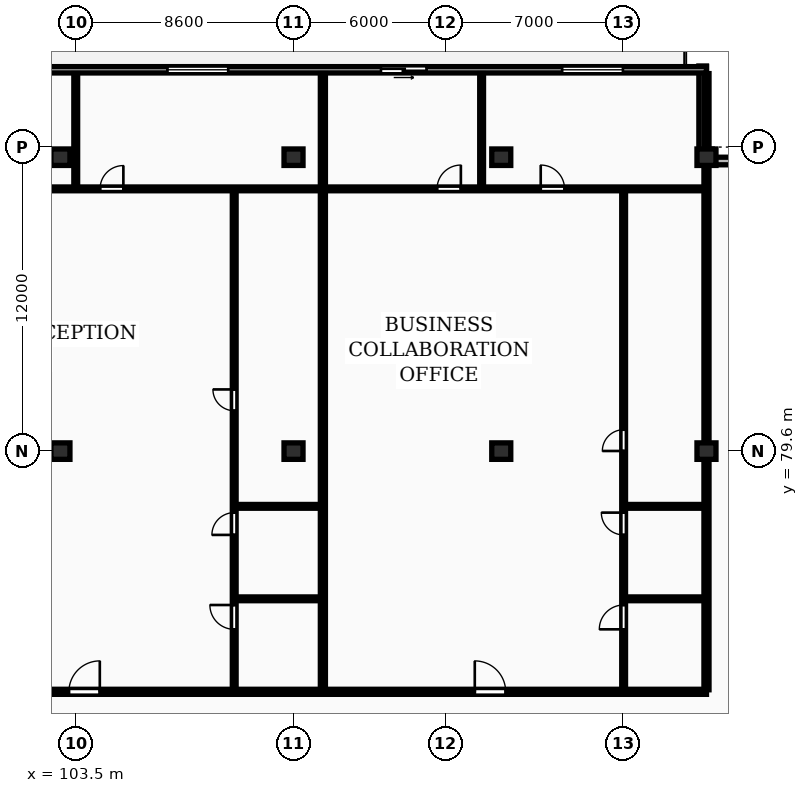
"""IFC4 building model, lengths in metres.
Left out: names, types, materials, properties, quantities, classifications, styles, units other than length and angle.
Written with IfcOpenShell. Run it as: python <this file> out.ifc"""

import sys

from ifc_helpers import new_model, si_unit, direction, frame, frame_2d, origin, origin_2d, place, context, subcontext, project, spatial, rectangle, extrude, element, fill, save


model = new_model("IFC4")
c1 = context("Model", 3, precision=1e-05, world=origin(), true_north=direction((0.0, 1.0)))
c2 = subcontext(c1, "Body", "Model", "MODEL_VIEW")
j1 = project(units=[si_unit("LENGTHUNIT", "METRE"), si_unit("PLANEANGLEUNIT", "RADIAN")], contexts=[c1])
p1 = place(None, origin())
s1 = spatial("IfcSite", under=j1, at=p1, CompositionType="ELEMENT")
p2 = place(p1, origin())
s2 = spatial("IfcBuilding", under=s1, at=p2, CompositionType="ELEMENT")
p3 = place(p2, frame((0.0, 0.0, 249.35)))
s3 = spatial("IfcBuildingStorey", under=s2, at=p3, CompositionType="ELEMENT", Elevation=249.35)
for number, where, z_axis, x_axis in (
    (1, (102.9, 79.6, 0.0), (0.0, 0.0, 1.0), (1.0, 0.0, 0.0)),
    (2, (102.9, 91.2, 0.0), (0.0, 0.0, 1.0), (1.0, 0.0, 0.0)),
    (3, (112.1, 79.6, 0.0), (0.0, 0.0, 1.0), (1.0, 0.0, 0.0)),
    (4, (112.1, 91.2, 0.0), (0.0, 0.0, 1.0), (1.0, 0.0, 0.0)),
    (5, (120.3, 79.6, 0.0), (0.0, 0.0, 1.0), (1.0, 0.0, 0.0)),
    (6, (120.3, 91.2, 0.0), (0.0, 0.0, 1.0), (1.0, 0.0, 0.0)),
    (7, (128.4, 79.6, 0.0), (0.0, 0.0, 1.0), (1.0, 0.0, 0.0)),
    (8, (128.4, 91.2, 0.0), (0.0, 0.0, 1.0), (1.0, 0.0, 0.0)),
):
    element("IfcColumn", number, at=place(p3, frame(where, z_axis=z_axis, x_axis=x_axis)), inside=s3, PredefinedType="COLUMN", context=c2, shape_type="SweptSolid", body=[
        extrude(rectangle(XDim=0.75, YDim=0.65, at=origin_2d()), origin(), (0.0, 0.0, 1.0), 3.45),
    ])
for number, where, z_axis, x_axis in (
    (9, (132.0, 91.05, 0.0), (0.0, 0.0, 1.0), (-1.0, 0.0, 0.0)),
    (10, (128.25, 91.2, 0.0), (0.0, 0.0, 1.0), (0.0, 1.0, 0.0)),
):
    element("IfcWall", number, at=place(p3, frame(where, z_axis=z_axis, x_axis=x_axis)), inside=s3, PredefinedType="STANDARD", context=c2, shape_type="SweptSolid", body=[
        extrude(rectangle(XDim=3.6, YDim=0.3, at=frame_2d((1.8, 0.0))), origin(), (0.0, 0.0, 1.0), 3.17),
    ])
p4 = place(p3, frame((128.4, 94.65, 0.0), z_axis=(0.0, 0.0, 1.0), x_axis=(-1.0, 0.0, 0.0)))
e11 = element("IfcWall", 11, at=p4, inside=s3, PredefinedType="STANDARD", context=c2, shape_type="SweptSolid", body=[
    extrude(rectangle(XDim=68.6, YDim=0.25, at=frame_2d((34.3, 0.0))), origin(), (0.0, 0.0, 1.0), 3.17),
])
p5 = place(p4, frame((60.518, 0.0, 0.85)))
e12 = element("IfcOpeningElement", 12, at=p5, cuts=e11, PredefinedType="OPENING", context=c2, shape_type="SweptSolid", body=[
    extrude(rectangle(XDim=2.4, YDim=1.9, at=frame_2d((1.2, 0.95))), frame((0.0, 0.135, 0.0), z_axis=(0.0, -1.0, 0.0), x_axis=(1.0, 0.0, 0.0)), (0.0, 0.0, 1.0), 0.27),
])
p6 = place(p4, frame((55.492, 0.0, 0.85)))
e13 = element("IfcOpeningElement", 13, at=p6, cuts=e11, PredefinedType="OPENING", context=c2, shape_type="SweptSolid", body=[
    extrude(rectangle(XDim=2.4, YDim=1.9, at=frame_2d((1.2, 0.95))), frame((0.0, 0.135, 0.0), z_axis=(0.0, -1.0, 0.0), x_axis=(1.0, 0.0, 0.0)), (0.0, 0.0, 1.0), 0.27),
])
p7 = place(p4, frame((65.455, 0.0, 0.0)))
e14 = element("IfcOpeningElement", 14, at=p7, cuts=e11, PredefinedType="OPENING", context=c2, shape_type="SweptSolid", body=[
    extrude(rectangle(XDim=1.8, YDim=2.2, at=frame_2d((0.9, 1.1))), frame((0.0, 0.135, 0.0), z_axis=(0.0, -1.0, 0.0), x_axis=(1.0, 0.0, 0.0)), (0.0, 0.0, 1.0), 0.27),
])
p8 = place(p4, frame((50.746, 0.0, 0.85)))
e15 = element("IfcOpeningElement", 15, at=p8, cuts=e11, PredefinedType="OPENING", context=c2, shape_type="SweptSolid", body=[
    extrude(rectangle(XDim=2.4, YDim=1.9, at=frame_2d((1.2, 0.95))), frame((0.0, 0.135, 0.0), z_axis=(0.0, -1.0, 0.0), x_axis=(1.0, 0.0, 0.0)), (0.0, 0.0, 1.0), 0.27),
])
p9 = place(p4, frame((39.76, 0.0, 0.85)))
e16 = element("IfcOpeningElement", 16, at=p9, cuts=e11, PredefinedType="OPENING", context=c2, shape_type="SweptSolid", body=[
    extrude(rectangle(XDim=1.8, YDim=1.8, at=frame_2d((0.9, 0.9))), frame((0.0, 0.135, 0.0), z_axis=(0.0, -1.0, 0.0), x_axis=(1.0, 0.0, 0.0)), (0.0, 0.0, 1.0), 0.27),
])
p10 = place(p4, frame((37.04, 0.0, 0.85)))
e17 = element("IfcOpeningElement", 17, at=p10, cuts=e11, PredefinedType="OPENING", context=c2, shape_type="SweptSolid", body=[
    extrude(rectangle(XDim=1.8, YDim=1.8, at=frame_2d((0.9, 0.9))), frame((0.0, 0.135, 0.0), z_axis=(0.0, -1.0, 0.0), x_axis=(1.0, 0.0, 0.0)), (0.0, 0.0, 1.0), 0.27),
])
p11 = place(p4, frame((44.845, 0.0, 0.0)))
e18 = element("IfcOpeningElement", 18, at=p11, cuts=e11, PredefinedType="OPENING", context=c2, shape_type="SweptSolid", body=[
    extrude(rectangle(XDim=1.8, YDim=2.2, at=frame_2d((0.9, 1.1))), frame((0.0, 0.135, 0.0), z_axis=(0.0, -1.0, 0.0), x_axis=(1.0, 0.0, 0.0)), (0.0, 0.0, 1.0), 0.27),
])
p12 = place(p4, frame((33.056, 0.0, 0.85)))
e19 = element("IfcOpeningElement", 19, at=p12, cuts=e11, PredefinedType="OPENING", context=c2, shape_type="SweptSolid", body=[
    extrude(rectangle(XDim=2.4, YDim=1.9, at=frame_2d((1.2, 0.95))), frame((0.0, 0.135, 0.0), z_axis=(0.0, -1.0, 0.0), x_axis=(1.0, 0.0, 0.0)), (0.0, 0.0, 1.0), 0.27),
])
p13 = place(p4, frame((27.394, 0.0, 0.0)))
e20 = element("IfcOpeningElement", 20, at=p13, cuts=e11, PredefinedType="OPENING", context=c2, shape_type="SweptSolid", body=[
    extrude(rectangle(XDim=1.8, YDim=2.2, at=frame_2d((0.9, 1.1))), frame((0.0, 0.135, 0.0), z_axis=(0.0, -1.0, 0.0), x_axis=(1.0, 0.0, 0.0)), (0.0, 0.0, 1.0), 0.27),
])
p14 = place(p4, frame((18.879, 0.0, 0.85)))
e21 = element("IfcOpeningElement", 21, at=p14, cuts=e11, PredefinedType="OPENING", context=c2, shape_type="SweptSolid", body=[
    extrude(rectangle(XDim=2.4, YDim=1.9, at=frame_2d((1.2, 0.95))), frame((0.0, 0.135, 0.0), z_axis=(0.0, -1.0, 0.0), x_axis=(1.0, 0.0, 0.0)), (0.0, 0.0, 1.0), 0.27),
])
p15 = place(p4, frame((11.048, 0.0, 0.0)))
e22 = element("IfcOpeningElement", 22, at=p15, cuts=e11, PredefinedType="OPENING", context=c2, shape_type="SweptSolid", body=[
    extrude(rectangle(XDim=1.8, YDim=2.2, at=frame_2d((0.9, 1.1))), frame((0.0, 0.135, 0.0), z_axis=(0.0, -1.0, 0.0), x_axis=(1.0, 0.0, 0.0)), (0.0, 0.0, 1.0), 0.27),
])
p16 = place(p4, frame((3.298, 0.0, 0.85)))
e23 = element("IfcOpeningElement", 23, at=p16, cuts=e11, PredefinedType="OPENING", context=c2, shape_type="SweptSolid", body=[
    extrude(rectangle(XDim=2.4, YDim=1.9, at=frame_2d((1.2, 0.95))), frame((0.0, 0.135, 0.0), z_axis=(0.0, -1.0, 0.0), x_axis=(1.0, 0.0, 0.0)), (0.0, 0.0, 1.0), 0.27),
])
p17 = place(p3, frame((128.4, 70.18, 0.0), z_axis=(0.0, 0.0, 1.0), x_axis=(0.0, 1.0, 0.0)))
e24 = element("IfcWall", 24, at=p17, inside=s3, PredefinedType="PARTITIONING", context=c2, shape_type="SweptSolid", body=[
    extrude(rectangle(XDim=24.32, YDim=0.2, at=frame_2d((12.16, 0.0))), origin(), (0.0, 0.0, 1.0), 2.477),
])
p18 = place(p3, frame((113.259, 70.18, 0.0), z_axis=(0.0, 0.0, 1.0), x_axis=(0.0, 1.0, 0.0)))
e25 = element("IfcWall", 25, at=p18, inside=s3, PredefinedType="PARTITIONING", context=c2, shape_type="SweptSolid", body=[
    extrude(rectangle(XDim=24.32, YDim=0.2, at=frame_2d((12.16, 0.0))), origin(), (0.0, 0.0, 1.0), 3.17),
])
for number, where, z_axis, x_axis in (
    (26, (109.819, 73.77, 0.0), (0.0, 0.0, 1.0), (1.0, 0.0, 0.0)),
    (27, (109.819, 77.42, 0.0), (0.0, 0.0, 1.0), (1.0, 0.0, 0.0)),
):
    element("IfcWall", number, at=place(p3, frame(where, z_axis=z_axis, x_axis=x_axis)), inside=s3, PredefinedType="PARTITIONING", context=c2, shape_type="SweptSolid", body=[
        extrude(rectangle(XDim=3.36, YDim=0.15, at=frame_2d((1.68, 0.0))), origin(), (0.0, 0.0, 1.0), 3.17),
    ])
p19 = place(p3, frame((109.759, 70.16, 0.0), z_axis=(0.0, 0.0, 1.0), x_axis=(0.0, 1.0, 0.0)))
e28 = element("IfcWall", 28, at=p19, inside=s3, PredefinedType="PARTITIONING", context=c2, shape_type="SweptSolid", body=[
    extrude(rectangle(XDim=19.73, YDim=0.15, at=frame_2d((9.865, 0.0))), origin(), (0.0, 0.0, 1.0), 3.17),
])
p20 = place(p19, frame((2.406, 0.0, 0.0)))
e29 = element("IfcOpeningElement", 29, at=p20, cuts=e28, PredefinedType="OPENING", context=c2, shape_type="SweptSolid", body=[
    extrude(rectangle(XDim=0.96, YDim=2.1, at=frame_2d((0.48, 1.05))), frame((0.0, 0.085, 0.0), z_axis=(0.0, -1.0, 0.0), x_axis=(1.0, 0.0, 0.0)), (0.0, 0.0, 1.0), 0.17),
])
p21 = place(p19, frame((6.133, 0.0, 0.0)))
e30 = element("IfcOpeningElement", 30, at=p21, cuts=e28, PredefinedType="OPENING", context=c2, shape_type="SweptSolid", body=[
    extrude(rectangle(XDim=0.88, YDim=2.06, at=frame_2d((0.44, 1.03))), frame((0.0, 0.085, 0.0), z_axis=(0.0, -1.0, 0.0), x_axis=(1.0, 0.0, 0.0)), (0.0, 0.0, 1.0), 0.17),
])
p22 = place(p19, frame((11.034, 0.0, 0.0)))
e31 = element("IfcOpeningElement", 31, at=p22, cuts=e28, PredefinedType="OPENING", context=c2, shape_type="SweptSolid", body=[
    extrude(rectangle(XDim=0.84, YDim=2.04, at=frame_2d((0.42, 1.02))), frame((0.0, 0.085, 0.0), z_axis=(0.0, -1.0, 0.0), x_axis=(1.0, 0.0, 0.0)), (0.0, 0.0, 1.0), 0.17),
])
p23 = place(p3, frame((103.504, 90.03, 0.0), z_axis=(0.0, 0.0, 1.0), x_axis=(0.0, 1.0, 0.0)))
e32 = element("IfcWall", 32, at=p23, inside=s3, PredefinedType="PARTITIONING", context=c2, shape_type="SweptSolid", body=[
    extrude(rectangle(XDim=4.47, YDim=0.15, at=frame_2d((2.235, 0.0))), origin(), (0.0, 0.0, 1.0), 3.17),
])
p24 = place(p3, frame((96.669, 89.95, 0.0), z_axis=(0.0, 0.0, 1.0), x_axis=(1.0, 0.0, 0.0)))
e33 = element("IfcWall", 33, at=p24, inside=s3, PredefinedType="PARTITIONING", context=c2, shape_type="SweptSolid", body=[
    extrude(rectangle(XDim=16.51, YDim=0.15, at=frame_2d((8.255, 0.0))), origin(), (0.0, 0.0, 1.0), 3.17),
])
p25 = place(p24, frame((3.716, 0.0, 0.0)))
e34 = element("IfcOpeningElement", 34, at=p25, cuts=e33, PredefinedType="OPENING", context=c2, shape_type="SweptSolid", body=[
    extrude(rectangle(XDim=0.92, YDim=2.08, at=frame_2d((0.46, 1.04))), frame((0.0, 0.085, 0.0), z_axis=(0.0, -1.0, 0.0), x_axis=(1.0, 0.0, 0.0)), (0.0, 0.0, 1.0), 0.17),
])
p26 = place(p24, frame((7.795, 0.0, 0.0)))
e35 = element("IfcOpeningElement", 35, at=p26, cuts=e33, PredefinedType="OPENING", context=c2, shape_type="SweptSolid", body=[
    extrude(rectangle(XDim=0.92, YDim=2.08, at=frame_2d((0.46, 1.04))), frame((0.0, 0.085, 0.0), z_axis=(0.0, -1.0, 0.0), x_axis=(1.0, 0.0, 0.0)), (0.0, 0.0, 1.0), 0.17),
])
for number, where, z_axis, x_axis in (
    (36, (125.19, 73.77, 0.0), (0.0, 0.0, 1.0), (1.0, 0.0, 0.0)),
    (37, (125.19, 77.42, 0.0), (0.0, 0.0, 1.0), (1.0, 0.0, 0.0)),
):
    element("IfcWall", number, at=place(p3, frame(where, z_axis=z_axis, x_axis=x_axis)), inside=s3, PredefinedType="PARTITIONING", context=c2, shape_type="SweptSolid", body=[
        extrude(rectangle(XDim=3.13, YDim=0.15, at=frame_2d((1.565, 0.0))), origin(), (0.0, 0.0, 1.0), 3.17),
    ])
p27 = place(p3, frame((125.13, 70.16, 0.0), z_axis=(0.0, 0.0, 1.0), x_axis=(0.0, 1.0, 0.0)))
e38 = element("IfcWall", 38, at=p27, inside=s3, PredefinedType="PARTITIONING", context=c2, shape_type="SweptSolid", body=[
    extrude(rectangle(XDim=19.73, YDim=0.15, at=frame_2d((9.865, 0.0))), origin(), (0.0, 0.0, 1.0), 3.17),
])
p28 = place(p27, frame((2.406, 0.0, 0.0)))
e39 = element("IfcOpeningElement", 39, at=p28, cuts=e38, PredefinedType="OPENING", context=c2, shape_type="SweptSolid", body=[
    extrude(rectangle(XDim=0.96, YDim=2.1, at=frame_2d((0.48, 1.05))), frame((0.0, 0.085, 0.0), z_axis=(0.0, -1.0, 0.0), x_axis=(1.0, 0.0, 0.0)), (0.0, 0.0, 1.0), 0.17),
])
p29 = place(p27, frame((6.133, 0.0, 0.0)))
e40 = element("IfcOpeningElement", 40, at=p29, cuts=e38, PredefinedType="OPENING", context=c2, shape_type="SweptSolid", body=[
    extrude(rectangle(XDim=0.88, YDim=2.06, at=frame_2d((0.44, 1.03))), frame((0.0, 0.085, 0.0), z_axis=(0.0, -1.0, 0.0), x_axis=(1.0, 0.0, 0.0)), (0.0, 0.0, 1.0), 0.17),
])
p30 = place(p27, frame((9.445, 0.0, 0.0)))
e41 = element("IfcOpeningElement", 41, at=p30, cuts=e38, PredefinedType="OPENING", context=c2, shape_type="SweptSolid", body=[
    extrude(rectangle(XDim=0.84, YDim=2.04, at=frame_2d((0.42, 1.02))), frame((0.0, 0.085, 0.0), z_axis=(0.0, -1.0, 0.0), x_axis=(1.0, 0.0, 0.0)), (0.0, 0.0, 1.0), 0.17),
])
p31 = place(p3, frame((119.524, 90.03, 0.0), z_axis=(0.0, 0.0, 1.0), x_axis=(0.0, 1.0, 0.0)))
e42 = element("IfcWall", 42, at=p31, inside=s3, PredefinedType="PARTITIONING", context=c2, shape_type="SweptSolid", body=[
    extrude(rectangle(XDim=4.47, YDim=0.15, at=frame_2d((2.235, 0.0))), origin(), (0.0, 0.0, 1.0), 3.17),
])
p32 = place(p3, frame((113.339, 89.95, 0.0), z_axis=(0.0, 0.0, 1.0), x_axis=(1.0, 0.0, 0.0)))
e43 = element("IfcWall", 43, at=p32, inside=s3, PredefinedType="PARTITIONING", context=c2, shape_type="SweptSolid", body=[
    extrude(rectangle(XDim=14.981, YDim=0.15, at=frame_2d((7.49, 0.0))), origin(), (0.0, 0.0, 1.0), 3.17),
])
p33 = place(p32, frame((4.426, 0.0, 0.0)))
e44 = element("IfcOpeningElement", 44, at=p33, cuts=e43, PredefinedType="OPENING", context=c2, shape_type="SweptSolid", body=[
    extrude(rectangle(XDim=0.94, YDim=2.1, at=frame_2d((0.47, 1.05))), frame((0.0, 0.085, 0.0), z_axis=(0.0, -1.0, 0.0), x_axis=(1.0, 0.0, 0.0)), (0.0, 0.0, 1.0), 0.17),
])
p34 = place(p32, frame((8.518, 0.0, 0.0)))
e45 = element("IfcOpeningElement", 45, at=p34, cuts=e43, PredefinedType="OPENING", context=c2, shape_type="SweptSolid", body=[
    extrude(rectangle(XDim=0.94, YDim=2.1, at=frame_2d((0.47, 1.05))), frame((0.0, 0.085, 0.0), z_axis=(0.0, -1.0, 0.0), x_axis=(1.0, 0.0, 0.0)), (0.0, 0.0, 1.0), 0.17),
])
p35 = place(p3, frame((59.8, 70.1, 0.0), z_axis=(0.0, 0.0, 1.0), x_axis=(1.0, 0.0, 0.0)))
e46 = element("IfcWall", 46, at=p35, inside=s3, PredefinedType="PARTITIONING", context=c2, shape_type="SweptSolid", body=[
    extrude(rectangle(XDim=68.6, YDim=0.2, at=frame_2d((34.3, 0.0))), origin(), (0.0, 0.0, 1.0), 3.17),
])
p36 = place(p35, frame((2.045, 0.0, 0.0)))
e47 = element("IfcOpeningElement", 47, at=p36, cuts=e46, PredefinedType="OPENING", context=c2, shape_type="SweptSolid", body=[
    extrude(rectangle(XDim=0.95, YDim=2.15, at=frame_2d((0.475, 1.075))), frame((0.0, 0.11, 0.0), z_axis=(0.0, -1.0, 0.0), x_axis=(1.0, 0.0, 0.0)), (0.0, 0.0, 1.0), 0.22),
])
p37 = place(p35, frame((21.054, 0.0, 0.0)))
e48 = element("IfcOpeningElement", 48, at=p37, cuts=e46, PredefinedType="OPENING", context=c2, shape_type="SweptSolid", body=[
    extrude(rectangle(XDim=0.95, YDim=2.15, at=frame_2d((0.475, 1.075))), frame((0.0, 0.11, 0.0), z_axis=(0.0, -1.0, 0.0), x_axis=(1.0, 0.0, 0.0)), (0.0, 0.0, 1.0), 0.22),
])
p38 = place(p35, frame((43.434, 0.0, 0.0)))
e49 = element("IfcOpeningElement", 49, at=p38, cuts=e46, PredefinedType="OPENING", context=c2, shape_type="SweptSolid", body=[
    extrude(rectangle(XDim=1.22, YDim=2.18, at=frame_2d((0.61, 1.09))), frame((0.0, 0.11, 0.0), z_axis=(0.0, -1.0, 0.0), x_axis=(1.0, 0.0, 0.0)), (0.0, 0.0, 1.0), 0.22),
])
p39 = place(p35, frame((59.455, 0.0, 0.0)))
e50 = element("IfcOpeningElement", 50, at=p39, cuts=e46, PredefinedType="OPENING", context=c2, shape_type="SweptSolid", body=[
    extrude(rectangle(XDim=1.22, YDim=2.18, at=frame_2d((0.61, 1.09))), frame((0.0, 0.11, 0.0), z_axis=(0.0, -1.0, 0.0), x_axis=(1.0, 0.0, 0.0)), (0.0, 0.0, 1.0), 0.22),
])
p40 = place(p14, origin())
e51 = element("IfcWindow", 51, at=p40, inside=s3, PartitioningType="DOUBLE_PANEL_VERTICAL", PredefinedType="WINDOW", context=c2, shape_type="SweptSolid", body=[
    extrude(rectangle(XDim=2.4, YDim=1.9, at=frame_2d((1.2, 0.95))), frame((0.0, 0.03, 0.0), z_axis=(0.0, -1.0, 0.0), x_axis=(1.0, 0.0, 0.0)), (0.0, 0.0, 1.0), 0.06),
])
fill(e21, e51)
p41 = place(p15, origin())
e52 = element("IfcDoor", 52, at=p41, inside=s3, OperationType="SLIDING_TO_LEFT", PredefinedType="DOOR", context=c2, shape_type="SweptSolid", body=[
    extrude(rectangle(XDim=1.8, YDim=2.2, at=frame_2d((0.9, 1.1))), frame((0.0, 0.025, 0.0), z_axis=(0.0, -1.0, 0.0), x_axis=(1.0, 0.0, 0.0)), (0.0, 0.0, 1.0), 0.05),
])
fill(e22, e52)
p42 = place(p16, origin())
e53 = element("IfcWindow", 53, at=p42, inside=s3, PartitioningType="DOUBLE_PANEL_VERTICAL", PredefinedType="WINDOW", context=c2, shape_type="SweptSolid", body=[
    extrude(rectangle(XDim=2.4, YDim=1.9, at=frame_2d((1.2, 0.95))), frame((0.0, 0.03, 0.0), z_axis=(0.0, -1.0, 0.0), x_axis=(1.0, 0.0, 0.0)), (0.0, 0.0, 1.0), 0.06),
])
fill(e23, e53)
p43 = place(p20, origin())
e54 = element("IfcDoor", 54, at=p43, inside=s3, OperationType="SINGLE_SWING_RIGHT", PredefinedType="DOOR", context=c2, shape_type="SweptSolid", body=[
    extrude(rectangle(XDim=0.96, YDim=2.1, at=frame_2d((0.48, 1.05))), frame((0.0, 0.025, 0.0), z_axis=(0.0, -1.0, 0.0), x_axis=(1.0, 0.0, 0.0)), (0.0, 0.0, 1.0), 0.05),
])
fill(e29, e54)
p44 = place(p21, origin())
e55 = element("IfcDoor", 55, at=p44, inside=s3, OperationType="SINGLE_SWING_LEFT", PredefinedType="DOOR", context=c2, shape_type="SweptSolid", body=[
    extrude(rectangle(XDim=0.88, YDim=2.06, at=frame_2d((0.44, 1.03))), frame((0.0, 0.025, 0.0), z_axis=(0.0, -1.0, 0.0), x_axis=(1.0, 0.0, 0.0)), (0.0, 0.0, 1.0), 0.05),
])
fill(e30, e55)
p45 = place(p22, origin())
e56 = element("IfcDoor", 56, at=p45, inside=s3, OperationType="SINGLE_SWING_RIGHT", PredefinedType="DOOR", context=c2, shape_type="SweptSolid", body=[
    extrude(rectangle(XDim=0.84, YDim=2.04, at=frame_2d((0.42, 1.02))), frame((0.0, 0.025, 0.0), z_axis=(0.0, -1.0, 0.0), x_axis=(1.0, 0.0, 0.0)), (0.0, 0.0, 1.0), 0.05),
])
fill(e31, e56)
p46 = place(p26, origin())
e57 = element("IfcDoor", 57, at=p46, inside=s3, OperationType="SINGLE_SWING_RIGHT", PredefinedType="DOOR", context=c2, shape_type="SweptSolid", body=[
    extrude(rectangle(XDim=0.92, YDim=2.08, at=frame_2d((0.46, 1.04))), frame((0.0, 0.025, 0.0), z_axis=(0.0, -1.0, 0.0), x_axis=(1.0, 0.0, 0.0)), (0.0, 0.0, 1.0), 0.05),
])
fill(e35, e57)
p47 = place(p28, origin())
e58 = element("IfcDoor", 58, at=p47, inside=s3, OperationType="SINGLE_SWING_LEFT", PredefinedType="DOOR", context=c2, shape_type="SweptSolid", body=[
    extrude(rectangle(XDim=0.96, YDim=2.1, at=frame_2d((0.48, 1.05))), frame((0.0, 0.025, 0.0), z_axis=(0.0, -1.0, 0.0), x_axis=(1.0, 0.0, 0.0)), (0.0, 0.0, 1.0), 0.05),
])
fill(e39, e58)
p48 = place(p29, origin())
e59 = element("IfcDoor", 59, at=p48, inside=s3, OperationType="SINGLE_SWING_RIGHT", PredefinedType="DOOR", context=c2, shape_type="SweptSolid", body=[
    extrude(rectangle(XDim=0.88, YDim=2.06, at=frame_2d((0.44, 1.03))), frame((0.0, 0.025, 0.0), z_axis=(0.0, -1.0, 0.0), x_axis=(1.0, 0.0, 0.0)), (0.0, 0.0, 1.0), 0.05),
])
fill(e40, e59)
p49 = place(p30, origin())
e60 = element("IfcDoor", 60, at=p49, inside=s3, OperationType="SINGLE_SWING_LEFT", PredefinedType="DOOR", context=c2, shape_type="SweptSolid", body=[
    extrude(rectangle(XDim=0.84, YDim=2.04, at=frame_2d((0.42, 1.02))), frame((0.0, 0.025, 0.0), z_axis=(0.0, -1.0, 0.0), x_axis=(1.0, 0.0, 0.0)), (0.0, 0.0, 1.0), 0.05),
])
fill(e41, e60)
p50 = place(p33, origin())
e61 = element("IfcDoor", 61, at=p50, inside=s3, OperationType="SINGLE_SWING_RIGHT", PredefinedType="DOOR", context=c2, shape_type="SweptSolid", body=[
    extrude(rectangle(XDim=0.94, YDim=2.1, at=frame_2d((0.47, 1.05))), frame((0.0, 0.025, 0.0), z_axis=(0.0, -1.0, 0.0), x_axis=(1.0, 0.0, 0.0)), (0.0, 0.0, 1.0), 0.05),
])
fill(e44, e61)
p51 = place(p34, origin())
e62 = element("IfcDoor", 62, at=p51, inside=s3, OperationType="SINGLE_SWING_LEFT", PredefinedType="DOOR", context=c2, shape_type="SweptSolid", body=[
    extrude(rectangle(XDim=0.94, YDim=2.1, at=frame_2d((0.47, 1.05))), frame((0.0, 0.025, 0.0), z_axis=(0.0, -1.0, 0.0), x_axis=(1.0, 0.0, 0.0)), (0.0, 0.0, 1.0), 0.05),
])
fill(e45, e62)
p52 = place(p38, origin())
e63 = element("IfcDoor", 63, at=p52, inside=s3, OperationType="SINGLE_SWING_RIGHT", PredefinedType="DOOR", context=c2, shape_type="SweptSolid", body=[
    extrude(rectangle(XDim=1.22, YDim=2.18, at=frame_2d((0.61, 1.09))), frame((0.0, 0.025, 0.0), z_axis=(0.0, -1.0, 0.0), x_axis=(1.0, 0.0, 0.0)), (0.0, 0.0, 1.0), 0.05),
])
fill(e49, e63)
p53 = place(p39, origin())
e64 = element("IfcDoor", 64, at=p53, inside=s3, OperationType="SINGLE_SWING_LEFT", PredefinedType="DOOR", context=c2, shape_type="SweptSolid", body=[
    extrude(rectangle(XDim=1.22, YDim=2.18, at=frame_2d((0.61, 1.09))), frame((0.0, 0.025, 0.0), z_axis=(0.0, -1.0, 0.0), x_axis=(1.0, 0.0, 0.0)), (0.0, 0.0, 1.0), 0.05),
])
fill(e50, e64)
save(model, sys.argv[1])
